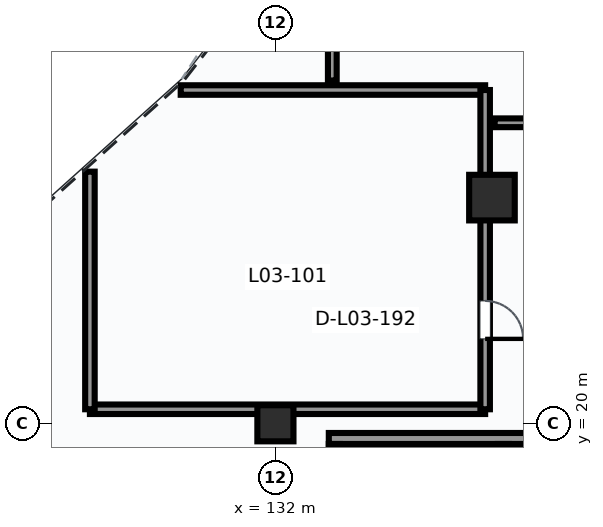
"""IFC4 building model, lengths in metres.
Left out: names, types, materials, properties, quantities, classifications, styles, units other than length and angle.
Written with IfcOpenShell. Run it as: python <this file> out.ifc"""

import sys

from ifc_helpers import new_model, si_unit, direction, frame, frame_2d, origin, origin_2d, place, context, subcontext, project, spatial, rectangle, extrude, element, fill, save


model = new_model("IFC4")
c1 = context("Model", 3, precision=1e-05, world=origin(), true_north=direction((0.0, 1.0)))
c2 = subcontext(c1, "Body", "Model", "MODEL_VIEW")
j1 = project(units=[si_unit("LENGTHUNIT", "METRE"), si_unit("PLANEANGLEUNIT", "RADIAN")], contexts=[c1])
p1 = place(None, origin())
s1 = spatial("IfcSite", under=j1, at=p1, CompositionType="ELEMENT")
p2 = place(p1, origin())
s2 = spatial("IfcBuilding", under=s1, at=p2, CompositionType="ELEMENT")
p3 = place(p2, frame((0.0, 0.0, 14.7)))
s3 = spatial("IfcBuildingStorey", under=s2, at=p3, CompositionType="ELEMENT", Elevation=14.7)
p4 = place(p3, frame((132.0, 20.0, 0.0), z_axis=(0.0, 0.0, 1.0), x_axis=(1.0, 0.0, 0.0)))
e1 = element("IfcColumn", 1, at=p4, inside=s3, PredefinedType="COLUMN", context=c2, shape_type="SweptSolid", body=[
    extrude(rectangle(XDim=0.95, YDim=0.95, at=origin_2d()), origin(), (0.0, 0.0, 1.0), 4.5),
])
p5 = place(p3, frame((137.698, 25.938, 0.0), z_axis=(0.0, 0.0, 1.0), x_axis=(1.0, 0.0, 0.0)))
e2 = element("IfcColumn", 2, at=p5, inside=s3, PredefinedType="COLUMN", context=c2, shape_type="SweptSolid", body=[
    extrude(rectangle(XDim=1.2, YDim=1.2, at=origin_2d()), origin(), (0.0, 0.0, 1.0), 4.5),
])
p6 = place(p3, frame((133.405, 19.6, 0.0), z_axis=(0.0, 0.0, 1.0), x_axis=(1.0, 0.0, 0.0)))
e3 = element("IfcWall", 3, at=p6, inside=s3, PredefinedType="SHEAR", context=c2, shape_type="SweptSolid", body=[
    extrude(rectangle(XDim=9.19, YDim=0.29, at=frame_2d((4.595, 0.0))), origin(), (0.0, 0.0, 1.0), 4.5),
])
p7 = place(p3, frame((133.55, 10.175, 0.0), z_axis=(0.0, 0.0, 1.0), x_axis=(0.0, 1.0, 0.0)))
e4 = element("IfcWall", 4, at=p7, inside=s3, PredefinedType="SHEAR", context=c2, shape_type="SweptSolid", body=[
    extrude(rectangle(XDim=9.28, YDim=0.29, at=frame_2d((4.64, 0.0))), origin(), (0.0, 0.0, 1.0), 4.5),
])
p8 = place(p7, frame((0.425, 0.0, 0.0)))
e5 = element("IfcOpeningElement", 5, at=p8, cuts=e4, PredefinedType="OPENING", context=c2, shape_type="SweptSolid", body=[
    extrude(rectangle(XDim=1.4, YDim=2.2, at=frame_2d((0.7, 1.1))), frame((0.0, 0.155, 0.0), z_axis=(0.0, -1.0, 0.0), x_axis=(1.0, 0.0, 0.0)), (0.0, 0.0, 1.0), 0.31),
])
p9 = place(p3, frame((138.0, 10.175, 0.0), z_axis=(0.0, 0.0, 1.0), x_axis=(0.0, 1.0, 0.0)))
e6 = element("IfcWall", 6, at=p9, inside=s3, PredefinedType="SHEAR", context=c2, shape_type="SweptSolid", body=[
    extrude(rectangle(XDim=9.28, YDim=0.29, at=frame_2d((4.64, 0.0))), origin(), (0.0, 0.0, 1.0), 4.5),
])
p10 = place(p3, frame((137.519, 20.369, 0.0), z_axis=(0.0, 0.0, 1.0), x_axis=(-1.0, 0.0, 0.0)))
e7 = element("IfcWall", 7, at=p10, inside=s3, PredefinedType="SOLIDWALL", context=c2, shape_type="SweptSolid", body=[
    extrude(rectangle(XDim=10.4, YDim=0.25, at=frame_2d((5.2, 0.0))), origin(), (0.0, 0.0, 1.0), 2.603),
])
p11 = place(p3, frame((127.119, 20.369, 0.0), z_axis=(0.0, 0.0, 1.0), x_axis=(0.0, 1.0, 0.0)))
e8 = element("IfcWall", 8, at=p11, inside=s3, PredefinedType="SOLIDWALL", context=c2, shape_type="SweptSolid", body=[
    extrude(rectangle(XDim=6.252, YDim=0.25, at=frame_2d((3.126, 0.0))), origin(), (0.0, 0.0, 1.0), 4.16),
])
p12 = place(p3, frame((129.508, 28.769, 0.0), z_axis=(0.0, 0.0, 1.0), x_axis=(1.0, 0.0, 0.0)))
e9 = element("IfcWall", 9, at=p12, inside=s3, PredefinedType="SOLIDWALL", context=c2, shape_type="SweptSolid", body=[
    extrude(rectangle(XDim=8.011, YDim=0.25, at=frame_2d((4.005, 0.0))), origin(), (0.0, 0.0, 1.0), 4.16),
])
p13 = place(p3, frame((137.519, 28.769, 0.0), z_axis=(0.0, 0.0, 1.0), x_axis=(0.0, -1.0, 0.0)))
e10 = element("IfcWall", 10, at=p13, inside=s3, PredefinedType="SOLIDWALL", context=c2, shape_type="SweptSolid", body=[
    extrude(rectangle(XDim=8.4, YDim=0.25, at=frame_2d((4.2, 0.0))), origin(), (0.0, 0.0, 1.0), 2.603),
])
p14 = place(p13, frame((5.548, 0.0, 0.0)))
e11 = element("IfcOpeningElement", 11, at=p14, cuts=e10, PredefinedType="OPENING", context=c2, shape_type="SweptSolid", body=[
    extrude(rectangle(XDim=1.0, YDim=2.2, at=frame_2d((0.5, 1.1))), frame((0.0, 0.135, 0.0), z_axis=(0.0, -1.0, 0.0), x_axis=(1.0, 0.0, 0.0)), (0.0, 0.0, 1.0), 0.27),
])
p15 = place(p3, frame((143.897, 27.907, 0.0), z_axis=(0.0, 0.0, 1.0), x_axis=(-1.0, 0.0, 0.0)))
e12 = element("IfcWall", 12, at=p15, inside=s3, PredefinedType="SOLIDWALL", context=c2, shape_type="SweptSolid", body=[
    extrude(rectangle(XDim=6.128, YDim=0.23, at=frame_2d((3.064, 0.0))), origin(), (0.0, 0.0, 1.0), 3.39),
])
p16 = place(p3, frame((133.497, 29.019, 0.0), z_axis=(0.0, 0.0, 1.0), x_axis=(0.0, 1.0, 0.0)))
e13 = element("IfcWall", 13, at=p16, inside=s3, PredefinedType="SOLIDWALL", context=c2, shape_type="SweptSolid", body=[
    extrude(rectangle(XDim=4.804, YDim=0.23, at=frame_2d((2.402, 0.0))), origin(), (0.0, 0.0, 1.0), 4.16),
])
p17 = place(p14, origin())
e14 = element("IfcDoor", 14, at=p17, inside=s3, OperationType="SINGLE_SWING_RIGHT", PredefinedType="DOOR", context=c2, shape_type="SweptSolid", body=[
    extrude(rectangle(XDim=1.0, YDim=2.2, at=frame_2d((0.5, 1.1))), frame((0.0, 0.025, 0.0), z_axis=(0.0, -1.0, 0.0), x_axis=(1.0, 0.0, 0.0)), (0.0, 0.0, 1.0), 0.05),
])
fill(e11, e14)
save(model, sys.argv[1])
